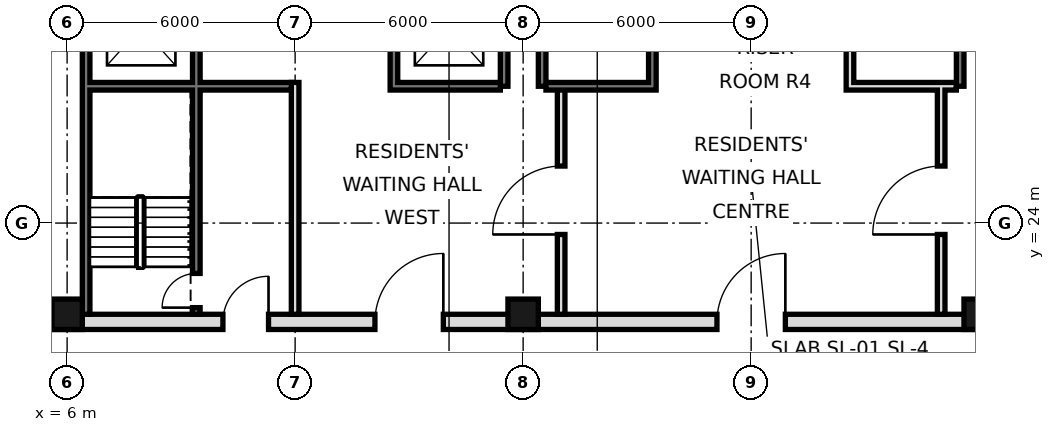
"""IFC4 building model, lengths in metres.
Left out: names, types, materials, properties, quantities, classifications, styles, units other than length and angle.
Written with IfcOpenShell. Run it as: python <this file> out.ifc"""

import sys

from ifc_helpers import new_model, si_unit, direction, frame, frame_2d, origin, origin_2d, place, context, subcontext, project, spatial, rectangle, hollow_rectangle, extrude, element, fill, save


model = new_model("IFC4")
c1 = context("Model", 3, precision=1e-05, world=origin(), true_north=direction((0.0, 1.0)))
c2 = subcontext(c1, "Body", "Model", "MODEL_VIEW")
j1 = project(units=[si_unit("LENGTHUNIT", "METRE"), si_unit("PLANEANGLEUNIT", "RADIAN")], contexts=[c1])
p1 = place(None, origin())
s1 = spatial("IfcSite", under=j1, at=p1, CompositionType="ELEMENT")
p2 = place(p1, origin())
s2 = spatial("IfcBuilding", under=s1, at=p2, CompositionType="ELEMENT")
p3 = place(p2, frame((0.0, 0.0, 15.0)))
s3 = spatial("IfcBuildingStorey", under=s2, at=p3, CompositionType="ELEMENT", Elevation=15.0)
for number, where, z_axis, x_axis in (
    (1, (6.0, 21.6, 0.0), (0.0, 0.0, 1.0), (1.0, 0.0, 0.0)),
    (2, (18.0, 21.6, 0.0), (0.0, 0.0, 1.0), (1.0, 0.0, 0.0)),
    (3, (30.0, 21.6, 0.0), (0.0, 0.0, 1.0), (1.0, 0.0, 0.0)),
):
    element("IfcColumn", number, at=place(p3, frame(where, z_axis=z_axis, x_axis=x_axis)), inside=s3, PredefinedType="COLUMN", context=c2, shape_type="SweptSolid", body=[
        extrude(hollow_rectangle(XDim=0.8, YDim=0.8, WallThickness=0.07, at=origin_2d()), origin(), (0.0, 0.0, 1.0), 5.4),
    ])
p4 = place(p3, frame((6.5, 21.6, 0.0), z_axis=(0.0, 0.0, 1.0), x_axis=(0.0, 1.0, 0.0)))
e4 = element("IfcWall", 4, at=p4, inside=s3, PredefinedType="SOLIDWALL", context=c2, shape_type="SweptSolid", body=[
    extrude(rectangle(XDim=23.5, YDim=0.2, at=frame_2d((11.75, 0.0))), origin(), (0.0, 0.0, 1.0), 5.0),
])
for number, where, z_axis, x_axis in (
    (5, (17.5, 27.6, 0.0), (0.0, 0.0, 1.0), (0.0, 1.0, 0.0)),
    (6, (18.5, 27.6, 0.0), (0.0, 0.0, 1.0), (0.0, 1.0, 0.0)),
    (7, (29.5, 27.6, 0.0), (0.0, 0.0, 1.0), (0.0, 1.0, 0.0)),
):
    element("IfcWall", number, at=place(p3, frame(where, z_axis=z_axis, x_axis=x_axis)), inside=s3, PredefinedType="SOLIDWALL", context=c2, shape_type="SweptSolid", body=[
        extrude(rectangle(XDim=17.5, YDim=0.2, at=frame_2d((8.75, 0.0))), origin(), (0.0, 0.0, 1.0), 5.0),
    ])
p5 = place(p3, frame((5.6, 21.4, 0.0), z_axis=(0.0, 0.0, 1.0), x_axis=(1.0, 0.0, 0.0)))
e8 = element("IfcWall", 8, at=p5, inside=s3, PredefinedType="SOLIDWALL", context=c2, shape_type="SweptSolid", body=[
    extrude(rectangle(XDim=36.8, YDim=0.4, at=frame_2d((18.4, 0.0))), origin(), (0.0, 0.0, 1.0), 3.2),
])
p6 = place(p5, frame((8.5, 0.0, 0.0)))
e9 = element("IfcOpeningElement", 9, at=p6, cuts=e8, PredefinedType="OPENING", context=c2, shape_type="SweptSolid", body=[
    extrude(rectangle(XDim=1.8, YDim=2.1, at=frame_2d((0.9, 1.05))), frame((0.0, 0.21, 0.0), z_axis=(0.0, -1.0, 0.0), x_axis=(1.0, 0.0, 0.0)), (0.0, 0.0, 1.0), 0.42),
])
p7 = place(p5, frame((17.5, 0.0, 0.0)))
e10 = element("IfcOpeningElement", 10, at=p7, cuts=e8, PredefinedType="OPENING", context=c2, shape_type="SweptSolid", body=[
    extrude(rectangle(XDim=1.8, YDim=2.1, at=frame_2d((0.9, 1.05))), frame((0.0, 0.21, 0.0), z_axis=(0.0, -1.0, 0.0), x_axis=(1.0, 0.0, 0.0)), (0.0, 0.0, 1.0), 0.42),
])
p8 = place(p5, frame((26.5, 0.0, 0.0)))
e11 = element("IfcOpeningElement", 11, at=p8, cuts=e8, PredefinedType="OPENING", context=c2, shape_type="SweptSolid", body=[
    extrude(rectangle(XDim=1.8, YDim=2.1, at=frame_2d((0.9, 1.05))), frame((0.0, 0.21, 0.0), z_axis=(0.0, -1.0, 0.0), x_axis=(1.0, 0.0, 0.0)), (0.0, 0.0, 1.0), 0.42),
])
p9 = place(p5, frame((4.5, 0.0, 0.0)))
e12 = element("IfcOpeningElement", 12, at=p9, cuts=e8, PredefinedType="OPENING", context=c2, shape_type="SweptSolid", body=[
    extrude(rectangle(XDim=1.2, YDim=2.1, at=frame_2d((0.6, 1.05))), frame((0.0, 0.21, 0.0), z_axis=(0.0, -1.0, 0.0), x_axis=(1.0, 0.0, 0.0)), (0.0, 0.0, 1.0), 0.42),
])
p10 = place(p5, frame((31.1, 0.0, 0.0)))
e13 = element("IfcOpeningElement", 13, at=p10, cuts=e8, PredefinedType="OPENING", context=c2, shape_type="SweptSolid", body=[
    extrude(rectangle(XDim=1.2, YDim=2.1, at=frame_2d((0.6, 1.05))), frame((0.0, 0.21, 0.0), z_axis=(0.0, -1.0, 0.0), x_axis=(1.0, 0.0, 0.0)), (0.0, 0.0, 1.0), 0.42),
])
p11 = place(p3, frame((19.0, 21.6, 0.0), z_axis=(0.0, 0.0, 1.0), x_axis=(0.0, 1.0, 0.0)))
e14 = element("IfcWall", 14, at=p11, inside=s3, PredefinedType="PARTITIONING", context=c2, shape_type="SweptSolid", body=[
    extrude(rectangle(XDim=6.0, YDim=0.2, at=frame_2d((3.0, 0.0))), origin(), (0.0, 0.0, 1.0), 3.2),
])
p12 = place(p11, frame((2.1, 0.0, 0.0)))
e15 = element("IfcOpeningElement", 15, at=p12, cuts=e14, PredefinedType="OPENING", context=c2, shape_type="SweptSolid", body=[
    extrude(rectangle(XDim=1.8, YDim=2.1, at=frame_2d((0.9, 1.05))), frame((0.0, 0.11, 0.0), z_axis=(0.0, -1.0, 0.0), x_axis=(1.0, 0.0, 0.0)), (0.0, 0.0, 1.0), 0.22),
])
p13 = place(p3, frame((29.0, 21.6, 0.0), z_axis=(0.0, 0.0, 1.0), x_axis=(0.0, 1.0, 0.0)))
e16 = element("IfcWall", 16, at=p13, inside=s3, PredefinedType="PARTITIONING", context=c2, shape_type="SweptSolid", body=[
    extrude(rectangle(XDim=6.0, YDim=0.2, at=frame_2d((3.0, 0.0))), origin(), (0.0, 0.0, 1.0), 3.2),
])
p14 = place(p13, frame((2.1, 0.0, 0.0)))
e17 = element("IfcOpeningElement", 17, at=p14, cuts=e16, PredefinedType="OPENING", context=c2, shape_type="SweptSolid", body=[
    extrude(rectangle(XDim=1.8, YDim=2.1, at=frame_2d((0.9, 1.05))), frame((0.0, 0.11, 0.0), z_axis=(0.0, -1.0, 0.0), x_axis=(1.0, 0.0, 0.0)), (0.0, 0.0, 1.0), 0.22),
])
p15 = place(p3, frame((12.0, 21.6, 0.0), z_axis=(0.0, 0.0, 1.0), x_axis=(0.0, 1.0, 0.0)))
e18 = element("IfcWall", 18, at=p15, inside=s3, PredefinedType="PARTITIONING", context=c2, shape_type="SweptSolid", body=[
    extrude(rectangle(XDim=6.1, YDim=0.2, at=frame_2d((3.05, 0.0))), origin(), (0.0, 0.0, 1.0), 3.2),
])
p16 = place(p3, frame((14.6, 27.5, 0.0), z_axis=(0.0, 0.0, 1.0), x_axis=(0.0, 1.0, 0.0)))
e19 = element("IfcWall", 19, at=p16, inside=s3, PredefinedType="SOLIDWALL", context=c2, shape_type="SweptSolid", body=[
    extrude(rectangle(XDim=17.5, YDim=0.2, at=frame_2d((8.75, 0.0))), origin(), (0.0, 0.0, 1.0), 5.0),
])
p17 = place(p16, frame((1.1, 0.0, 0.0)))
e20 = element("IfcOpeningElement", 20, at=p17, cuts=e19, PredefinedType="OPENING", context=c2, shape_type="SweptSolid", body=[
    extrude(rectangle(XDim=1.1, YDim=2.1, at=frame_2d((0.55, 1.05))), frame((0.0, 0.11, 0.0), z_axis=(0.0, -1.0, 0.0), x_axis=(1.0, 0.0, 0.0)), (0.0, 0.0, 1.0), 0.22),
])
p18 = place(p16, frame((4.2, 0.0, 0.0)))
e21 = element("IfcOpeningElement", 21, at=p18, cuts=e19, PredefinedType="OPENING", context=c2, shape_type="SweptSolid", body=[
    extrude(rectangle(XDim=1.1, YDim=2.1, at=frame_2d((0.55, 1.05))), frame((0.0, 0.11, 0.0), z_axis=(0.0, -1.0, 0.0), x_axis=(1.0, 0.0, 0.0)), (0.0, 0.0, 1.0), 0.22),
])
p19 = place(p16, frame((15.4, 0.0, 0.0)))
e22 = element("IfcOpeningElement", 22, at=p19, cuts=e19, PredefinedType="OPENING", context=c2, shape_type="SweptSolid", body=[
    extrude(rectangle(XDim=1.1, YDim=2.1, at=frame_2d((0.55, 1.05))), frame((0.0, 0.11, 0.0), z_axis=(0.0, -1.0, 0.0), x_axis=(1.0, 0.0, 0.0)), (0.0, 0.0, 1.0), 0.22),
])
p20 = place(p16, frame((9.9, 0.0, 0.0)))
e23 = element("IfcOpeningElement", 23, at=p20, cuts=e19, PredefinedType="OPENING", context=c2, shape_type="SweptSolid", body=[
    extrude(rectangle(XDim=0.9, YDim=2.1, at=frame_2d((0.45, 1.05))), frame((0.0, 0.11, 0.0), z_axis=(0.0, -1.0, 0.0), x_axis=(1.0, 0.0, 0.0)), (0.0, 0.0, 1.0), 0.22),
])
p21 = place(p3, frame((21.4, 27.5, 0.0), z_axis=(0.0, 0.0, 1.0), x_axis=(0.0, 1.0, 0.0)))
e24 = element("IfcWall", 24, at=p21, inside=s3, PredefinedType="SOLIDWALL", context=c2, shape_type="SweptSolid", body=[
    extrude(rectangle(XDim=17.5, YDim=0.2, at=frame_2d((8.75, 0.0))), origin(), (0.0, 0.0, 1.0), 5.0),
])
p22 = place(p21, frame((16.2, 0.0, 0.0)))
e25 = element("IfcOpeningElement", 25, at=p22, cuts=e24, PredefinedType="OPENING", context=c2, shape_type="SweptSolid", body=[
    extrude(rectangle(XDim=1.0, YDim=2.1, at=frame_2d((0.5, 1.05))), frame((0.0, 0.11, 0.0), z_axis=(0.0, -1.0, 0.0), x_axis=(1.0, 0.0, 0.0)), (0.0, 0.0, 1.0), 0.22),
])
p23 = place(p21, frame((7.4, 0.0, 0.0)))
e26 = element("IfcOpeningElement", 26, at=p23, cuts=e24, PredefinedType="OPENING", context=c2, shape_type="SweptSolid", body=[
    extrude(rectangle(XDim=0.9, YDim=2.1, at=frame_2d((0.45, 1.05))), frame((0.0, 0.11, 0.0), z_axis=(0.0, -1.0, 0.0), x_axis=(1.0, 0.0, 0.0)), (0.0, 0.0, 1.0), 0.22),
])
p24 = place(p3, frame((26.6, 27.5, 0.0), z_axis=(0.0, 0.0, 1.0), x_axis=(0.0, 1.0, 0.0)))
e27 = element("IfcWall", 27, at=p24, inside=s3, PredefinedType="SOLIDWALL", context=c2, shape_type="SweptSolid", body=[
    extrude(rectangle(XDim=17.5, YDim=0.2, at=frame_2d((8.75, 0.0))), origin(), (0.0, 0.0, 1.0), 5.0),
])
p25 = place(p24, frame((4.3, 0.0, 0.0)))
e28 = element("IfcOpeningElement", 28, at=p25, cuts=e27, PredefinedType="OPENING", context=c2, shape_type="SweptSolid", body=[
    extrude(rectangle(XDim=0.9, YDim=2.1, at=frame_2d((0.45, 1.05))), frame((0.0, 0.11, 0.0), z_axis=(0.0, -1.0, 0.0), x_axis=(1.0, 0.0, 0.0)), (0.0, 0.0, 1.0), 0.22),
])
p26 = place(p24, frame((10.35, 0.0, 0.0)))
e29 = element("IfcOpeningElement", 29, at=p26, cuts=e27, PredefinedType="OPENING", context=c2, shape_type="SweptSolid", body=[
    extrude(rectangle(XDim=1.0, YDim=2.1, at=frame_2d((0.5, 1.05))), frame((0.0, 0.11, 0.0), z_axis=(0.0, -1.0, 0.0), x_axis=(1.0, 0.0, 0.0)), (0.0, 0.0, 1.0), 0.22),
])
p27 = place(p24, frame((15.475, 0.0, 0.0)))
e30 = element("IfcOpeningElement", 30, at=p27, cuts=e27, PredefinedType="OPENING", context=c2, shape_type="SweptSolid", body=[
    extrude(rectangle(XDim=1.0, YDim=2.1, at=frame_2d((0.5, 1.05))), frame((0.0, 0.11, 0.0), z_axis=(0.0, -1.0, 0.0), x_axis=(1.0, 0.0, 0.0)), (0.0, 0.0, 1.0), 0.22),
])
p28 = place(p3, frame((9.4, 21.6, 0.0), z_axis=(0.0, 0.0, 1.0), x_axis=(0.0, 1.0, 0.0)))
e31 = element("IfcWall", 31, at=p28, inside=s3, PredefinedType="SOLIDWALL", context=c2, shape_type="SweptSolid", body=[
    extrude(rectangle(XDim=23.4, YDim=0.2, at=frame_2d((11.7, 0.0))), origin(), (0.0, 0.0, 1.0), 3.2),
])
p29 = place(p28, frame((7.0, 0.0, 0.0)))
e32 = element("IfcOpeningElement", 32, at=p29, cuts=e31, PredefinedType="OPENING", context=c2, shape_type="SweptSolid", body=[
    extrude(rectangle(XDim=1.1, YDim=2.1, at=frame_2d((0.55, 1.05))), frame((0.0, 0.11, 0.0), z_axis=(0.0, -1.0, 0.0), x_axis=(1.0, 0.0, 0.0)), (0.0, 0.0, 1.0), 0.22),
])
p30 = place(p28, frame((10.1, 0.0, 0.0)))
e33 = element("IfcOpeningElement", 33, at=p30, cuts=e31, PredefinedType="OPENING", context=c2, shape_type="SweptSolid", body=[
    extrude(rectangle(XDim=1.1, YDim=2.1, at=frame_2d((0.55, 1.05))), frame((0.0, 0.11, 0.0), z_axis=(0.0, -1.0, 0.0), x_axis=(1.0, 0.0, 0.0)), (0.0, 0.0, 1.0), 0.22),
])
p31 = place(p28, frame((13.2, 0.0, 0.0)))
e34 = element("IfcOpeningElement", 34, at=p31, cuts=e31, PredefinedType="OPENING", context=c2, shape_type="SweptSolid", body=[
    extrude(rectangle(XDim=1.1, YDim=2.1, at=frame_2d((0.55, 1.05))), frame((0.0, 0.11, 0.0), z_axis=(0.0, -1.0, 0.0), x_axis=(1.0, 0.0, 0.0)), (0.0, 0.0, 1.0), 0.22),
])
p32 = place(p28, frame((22.1, 0.0, 0.0)))
e35 = element("IfcOpeningElement", 35, at=p32, cuts=e31, PredefinedType="OPENING", context=c2, shape_type="SweptSolid", body=[
    extrude(rectangle(XDim=1.0, YDim=2.1, at=frame_2d((0.5, 1.05))), frame((0.0, 0.11, 0.0), z_axis=(0.0, -1.0, 0.0), x_axis=(1.0, 0.0, 0.0)), (0.0, 0.0, 1.0), 0.22),
])
p33 = place(p28, frame((0.175, 0.0, 0.0)))
e36 = element("IfcOpeningElement", 36, at=p33, cuts=e31, PredefinedType="OPENING", context=c2, shape_type="SweptSolid", body=[
    extrude(rectangle(XDim=0.9, YDim=2.1, at=frame_2d((0.45, 1.05))), frame((0.0, 0.11, 0.0), z_axis=(0.0, -1.0, 0.0), x_axis=(1.0, 0.0, 0.0)), (0.0, 0.0, 1.0), 0.22),
])
for number, where, z_axis, x_axis in (
    (37, (14.7, 27.6, 0.0), (0.0, 0.0, 1.0), (1.0, 0.0, 0.0)),
    (38, (18.6, 27.6, 0.0), (0.0, 0.0, 1.0), (1.0, 0.0, 0.0)),
    (39, (26.7, 27.6, 0.0), (0.0, 0.0, 1.0), (1.0, 0.0, 0.0)),
):
    element("IfcWall", number, at=place(p3, frame(where, z_axis=z_axis, x_axis=x_axis)), inside=s3, PredefinedType="SOLIDWALL", context=c2, shape_type="SweptSolid", body=[
        extrude(rectangle(XDim=2.7, YDim=0.2, at=frame_2d((1.35, 0.0))), origin(), (0.0, 0.0, 1.0), 5.0),
    ])
p34 = place(p3, frame((6.6, 27.6, 0.0), z_axis=(0.0, 0.0, 1.0), x_axis=(1.0, 0.0, 0.0)))
e40 = element("IfcWall", 40, at=p34, inside=s3, PredefinedType="SOLIDWALL", context=c2, shape_type="SweptSolid", body=[
    extrude(rectangle(XDim=5.3, YDim=0.2, at=frame_2d((2.65, 0.0))), origin(), (0.0, 0.0, 1.0), 5.0),
])
p35 = place(p6, frame((1.8, 0.0, 0.0), z_axis=(0.0, 0.0, 1.0), x_axis=(-1.0, 0.0, 0.0)))
e41 = element("IfcDoor", 41, at=p35, inside=s3, OperationType="SINGLE_SWING_LEFT", PredefinedType="DOOR", context=c2, shape_type="SweptSolid", body=[
    extrude(rectangle(XDim=1.8, YDim=2.1, at=frame_2d((0.9, 1.05))), frame((0.0, 0.025, 0.0), z_axis=(0.0, -1.0, 0.0), x_axis=(1.0, 0.0, 0.0)), (0.0, 0.0, 1.0), 0.05),
])
fill(e9, e41)
p36 = place(p12, origin())
e42 = element("IfcDoor", 42, at=p36, inside=s3, OperationType="SINGLE_SWING_LEFT", PredefinedType="DOOR", context=c2, shape_type="SweptSolid", body=[
    extrude(rectangle(XDim=1.8, YDim=2.1, at=frame_2d((0.9, 1.05))), frame((0.0, 0.025, 0.0), z_axis=(0.0, -1.0, 0.0), x_axis=(1.0, 0.0, 0.0)), (0.0, 0.0, 1.0), 0.05),
])
fill(e15, e42)
p37 = place(p7, frame((1.8, 0.0, 0.0), z_axis=(0.0, 0.0, 1.0), x_axis=(-1.0, 0.0, 0.0)))
e43 = element("IfcDoor", 43, at=p37, inside=s3, OperationType="SINGLE_SWING_LEFT", PredefinedType="DOOR", context=c2, shape_type="SweptSolid", body=[
    extrude(rectangle(XDim=1.8, YDim=2.1, at=frame_2d((0.9, 1.05))), frame((0.0, 0.025, 0.0), z_axis=(0.0, -1.0, 0.0), x_axis=(1.0, 0.0, 0.0)), (0.0, 0.0, 1.0), 0.05),
])
fill(e10, e43)
p38 = place(p14, origin())
e44 = element("IfcDoor", 44, at=p38, inside=s3, OperationType="SINGLE_SWING_LEFT", PredefinedType="DOOR", context=c2, shape_type="SweptSolid", body=[
    extrude(rectangle(XDim=1.8, YDim=2.1, at=frame_2d((0.9, 1.05))), frame((0.0, 0.025, 0.0), z_axis=(0.0, -1.0, 0.0), x_axis=(1.0, 0.0, 0.0)), (0.0, 0.0, 1.0), 0.05),
])
fill(e17, e44)
p39 = place(p9, frame((1.2, 0.0, 0.0), z_axis=(0.0, 0.0, 1.0), x_axis=(-1.0, 0.0, 0.0)))
e45 = element("IfcDoor", 45, at=p39, inside=s3, OperationType="SINGLE_SWING_LEFT", PredefinedType="DOOR", context=c2, shape_type="SweptSolid", body=[
    extrude(rectangle(XDim=1.2, YDim=2.1, at=frame_2d((0.6, 1.05))), frame((0.0, 0.025, 0.0), z_axis=(0.0, -1.0, 0.0), x_axis=(1.0, 0.0, 0.0)), (0.0, 0.0, 1.0), 0.05),
])
fill(e12, e45)
p40 = place(p33, origin())
e46 = element("IfcDoor", 46, at=p40, inside=s3, OperationType="SINGLE_SWING_LEFT", PredefinedType="DOOR", context=c2, shape_type="SweptSolid", body=[
    extrude(rectangle(XDim=0.9, YDim=2.1, at=frame_2d((0.45, 1.05))), frame((0.0, 0.025, 0.0), z_axis=(0.0, -1.0, 0.0), x_axis=(1.0, 0.0, 0.0)), (0.0, 0.0, 1.0), 0.05),
])
fill(e36, e46)
save(model, sys.argv[1])
